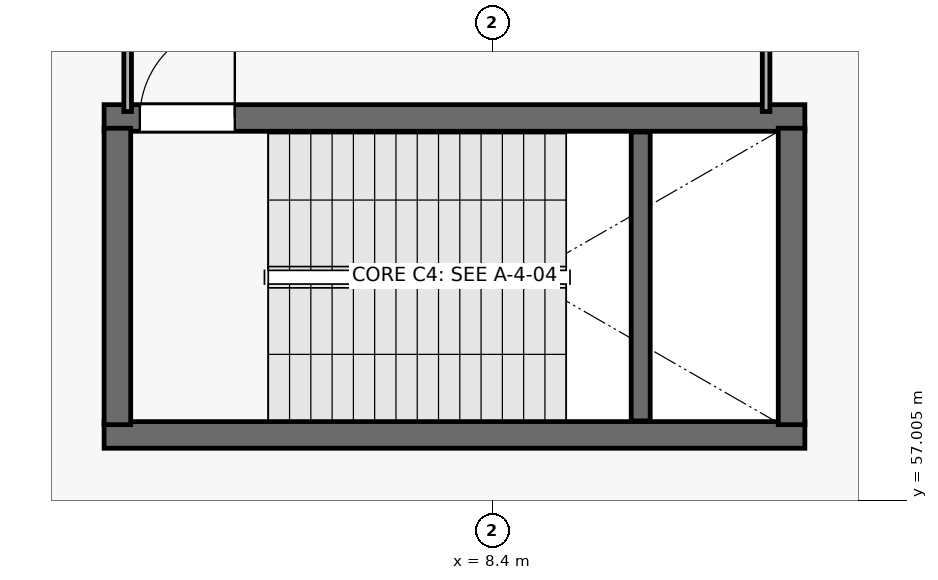
"""IFC4 building model, lengths in metres.
Left out: names, types, materials, properties, quantities, classifications, styles, units other than length and angle.
Written with IfcOpenShell. Run it as: python <this file> out.ifc"""

import sys

from ifc_helpers import new_model, si_unit, direction, frame, frame_2d, origin, place, context, subcontext, project, spatial, rectangle, extrude, element, fill, save


model = new_model("IFC4")
c1 = context("Model", 3, precision=1e-05, world=origin(), true_north=direction((0.0, 1.0)))
c2 = subcontext(c1, "Body", "Model", "MODEL_VIEW")
j1 = project(units=[si_unit("LENGTHUNIT", "METRE"), si_unit("PLANEANGLEUNIT", "RADIAN")], contexts=[c1])
p1 = place(None, origin())
s1 = spatial("IfcSite", under=j1, at=p1, CompositionType="ELEMENT")
p2 = place(p1, origin())
s2 = spatial("IfcBuilding", under=s1, at=p2, CompositionType="ELEMENT")
p3 = place(p2, origin())
s3 = spatial("IfcBuildingStorey", under=s2, at=p3, CompositionType="ELEMENT", Elevation=0.0)
p4 = place(p3, frame((3.29, 57.865, 0.0), z_axis=(0.0, 0.0, 1.0), x_axis=(1.0, 0.0, 0.0)))
e1 = element("IfcWall", 1, at=p4, inside=s3, PredefinedType="SHEAR", context=c2, shape_type="SweptSolid", body=[
    extrude(rectangle(XDim=9.22, YDim=0.35, at=frame_2d((4.61, 0.0))), origin(), (0.0, 0.0, 1.0), 5.12),
])
p5 = place(p3, frame((12.51, 62.035, 0.0), z_axis=(0.0, 0.0, 1.0), x_axis=(-1.0, 0.0, 0.0)))
e2 = element("IfcWall", 2, at=p5, inside=s3, PredefinedType="SHEAR", context=c2, shape_type="SweptSolid", body=[
    extrude(rectangle(XDim=9.22, YDim=0.35, at=frame_2d((4.61, 0.0))), origin(), (0.0, 0.0, 1.0), 5.12),
])
p6 = place(p5, frame((7.5, 0.0, 0.0)))
e3 = element("IfcOpeningElement", 3, at=p6, cuts=e2, PredefinedType="OPENING", context=c2, shape_type="SweptSolid", body=[
    extrude(rectangle(XDim=1.25, YDim=2.2, at=frame_2d((0.625, 1.1))), frame((0.0, 0.185, 0.0), z_axis=(0.0, -1.0, 0.0), x_axis=(1.0, 0.0, 0.0)), (0.0, 0.0, 1.0), 0.37),
])
for number, where, z_axis, x_axis in (
    (4, (3.465, 58.0, 0.0), (0.0, 0.0, 1.0), (0.0, 1.0, 0.0)),
    (5, (12.335, 61.9, 0.0), (0.0, 0.0, 1.0), (0.0, -1.0, 0.0)),
):
    element("IfcWall", number, at=place(p3, frame(where, z_axis=z_axis, x_axis=x_axis)), inside=s3, PredefinedType="SHEAR", context=c2, shape_type="SweptSolid", body=[
        extrude(rectangle(XDim=3.9, YDim=0.35, at=frame_2d((1.95, 0.0))), origin(), (0.0, 0.0, 1.0), 5.12),
    ])
p7 = place(p3, frame((10.35, 58.05, 0.0), z_axis=(0.0, 0.0, 1.0), x_axis=(0.0, 1.0, 0.0)))
e6 = element("IfcWall", 6, at=p7, inside=s3, PredefinedType="SHEAR", context=c2, shape_type="SweptSolid", body=[
    extrude(rectangle(XDim=3.8, YDim=0.25, at=frame_2d((1.9, 0.0))), origin(), (0.0, 0.0, 1.0), 2.52),
])
p8 = place(p3, frame((3.6, 72.3, 0.0), z_axis=(0.0, 0.0, 1.0), x_axis=(0.0, -1.0, 0.0)))
e7 = element("IfcWall", 7, at=p8, inside=s3, PredefinedType="PARTITIONING", context=c2, shape_type="SweptSolid", body=[
    extrude(rectangle(XDim=10.18, YDim=0.1, at=frame_2d((5.09, 0.0))), origin(), (0.0, 0.0, 1.0), 5.12),
])
p9 = place(p3, frame((12.0, 62.12, 0.0), z_axis=(0.0, 0.0, 1.0), x_axis=(0.0, 1.0, 0.0)))
e8 = element("IfcWall", 8, at=p9, inside=s3, PredefinedType="PARTITIONING", context=c2, shape_type="SweptSolid", body=[
    extrude(rectangle(XDim=3.55, YDim=0.1, at=frame_2d((1.775, 0.0))), origin(), (0.0, 0.0, 1.0), 5.12),
])
p10 = place(p6, origin())
e9 = element("IfcDoor", 9, at=p10, inside=s3, OperationType="SINGLE_SWING_RIGHT", PredefinedType="DOOR", context=c2, shape_type="SweptSolid", body=[
    extrude(rectangle(XDim=1.25, YDim=2.2, at=frame_2d((0.625, 1.1))), frame((0.0, 0.025, 0.0), z_axis=(0.0, -1.0, 0.0), x_axis=(1.0, 0.0, 0.0)), (0.0, 0.0, 1.0), 0.05),
])
fill(e3, e9)
save(model, sys.argv[1])
